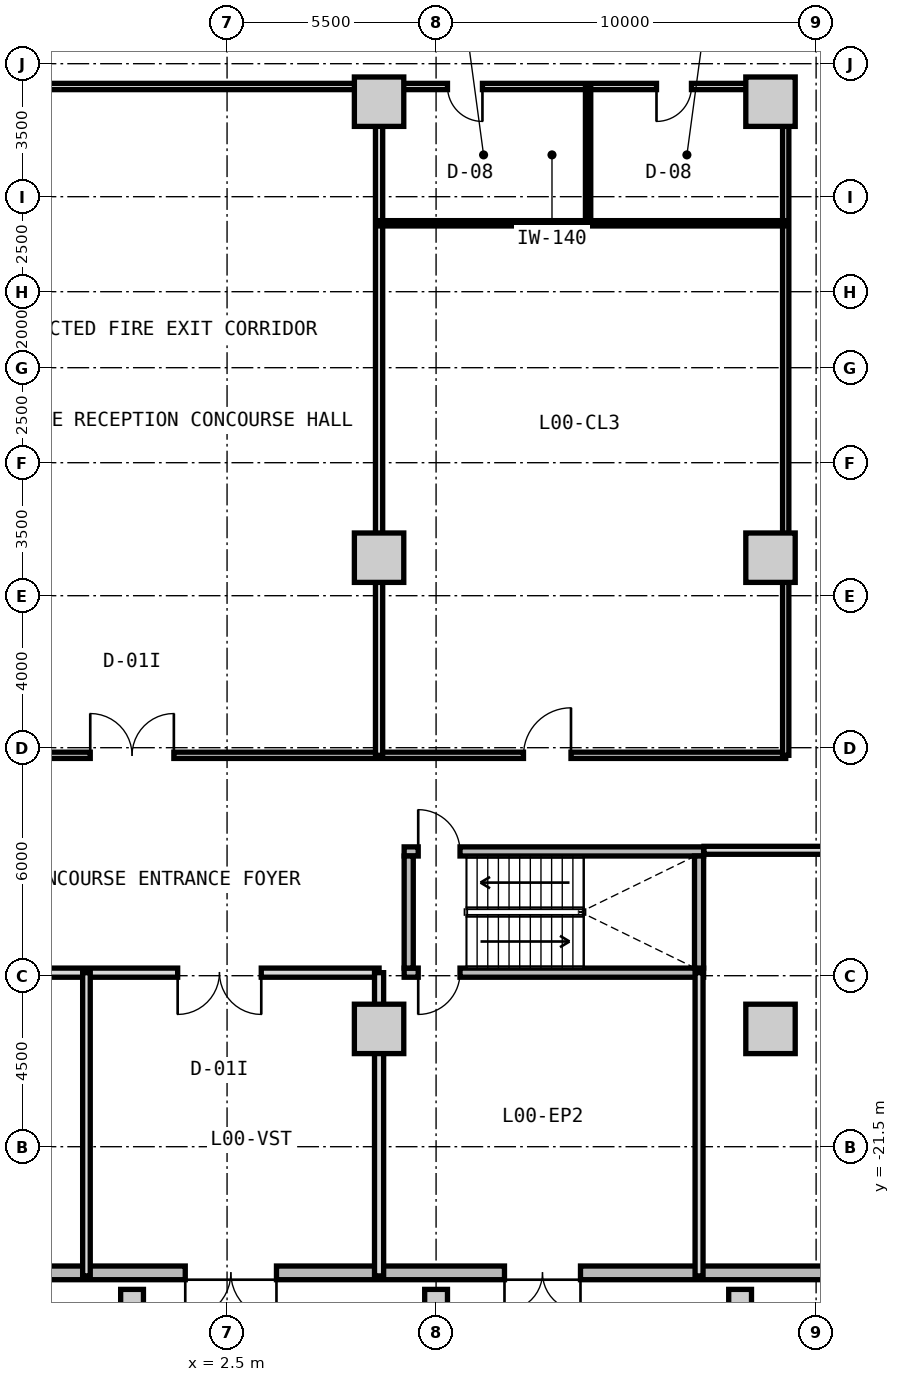
"""IFC4 building model, lengths in metres.
Left out: names, types, materials, properties, quantities, classifications, styles, units other than length and angle.
Written with IfcOpenShell. Run it as: python <this file> out.ifc"""

import sys

from ifc_helpers import new_model, si_unit, direction, frame, frame_2d, origin, origin_2d, place, context, subcontext, project, spatial, rectangle, extrude, source, transform, mapped, element, fill, save


model = new_model("IFC4")
c1 = context("Model", 3, precision=1e-05, world=origin(), true_north=direction((0.0, 1.0)))
c2 = subcontext(c1, "Body", "Model", "MODEL_VIEW")
j1 = project(units=[si_unit("LENGTHUNIT", "METRE"), si_unit("PLANEANGLEUNIT", "RADIAN")], contexts=[c1])
p1 = place(None, origin())
s1 = spatial("IfcSite", under=j1, at=p1, CompositionType="ELEMENT")
p2 = place(p1, origin())
s2 = spatial("IfcBuilding", under=s1, at=p2, CompositionType="ELEMENT")
p3 = place(p2, origin())
s3 = spatial("IfcBuildingStorey", under=s2, at=p3, CompositionType="ELEMENT", Elevation=0.0)
m1 = source(origin(), c2, "Body", "SweptSolid", [
    extrude(rectangle(XDim=1.3, YDim=1.3, at=origin_2d()), origin(), (0.0, 0.0, 1.0), 4.2),
])
for number, where, z_axis, x_axis in (
    (1, (6.5, -18.4, 0.0), (0.0, 0.0, 1.0), (1.0, 0.0, 0.0)),
    (2, (16.8, -18.4, 0.0), (0.0, 0.0, 1.0), (1.0, 0.0, 0.0)),
    (3, (6.5, -6.0, 0.0), (0.0, 0.0, 1.0), (1.0, 0.0, 0.0)),
    (4, (6.5, 6.0, 0.0), (0.0, 0.0, 1.0), (1.0, 0.0, 0.0)),
    (5, (16.8, -6.0, 0.0), (0.0, 0.0, 1.0), (1.0, 0.0, 0.0)),
    (6, (16.8, 6.0, 0.0), (0.0, 0.0, 1.0), (1.0, 0.0, 0.0)),
):
    element("IfcColumn", number, at=place(p3, frame(where, z_axis=z_axis, x_axis=x_axis)), inside=s3, PredefinedType="COLUMN", context=c2, shape_type="MappedRepresentation", body=[
        mapped(m1, transform((0.0, 0.0, 0.0), x_axis=(1.0, 0.0, 0.0), y_axis=(0.0, 1.0, 0.0), z_axis=(0.0, 0.0, 1.0), scale=1.0)),
    ])
m2 = source(origin(), c2, "Body", "SweptSolid", [
    extrude(rectangle(XDim=0.6, YDim=0.45, at=origin_2d()), origin(), (0.0, 0.0, 1.0), 4.2),
])
for number, where, z_axis, x_axis in (
    (7, (0.0, -25.48, 0.0), (0.0, 0.0, 1.0), (1.0, 0.0, 0.0)),
    (8, (8.0, -25.48, 0.0), (0.0, 0.0, 1.0), (1.0, 0.0, 0.0)),
    (9, (16.0, -25.48, 0.0), (0.0, 0.0, 1.0), (1.0, 0.0, 0.0)),
):
    element("IfcColumn", number, at=place(p3, frame(where, z_axis=z_axis, x_axis=x_axis)), inside=s3, PredefinedType="PILASTER", context=c2, shape_type="MappedRepresentation", body=[
        mapped(m2, transform((0.0, 0.0, 0.0), x_axis=(1.0, 0.0, 0.0), y_axis=(0.0, 1.0, 0.0), z_axis=(0.0, 0.0, 1.0), scale=1.0)),
    ])
m3 = source(origin(), c2, "Body", "SweptSolid", [
    extrude(rectangle(XDim=108.64, YDim=0.36, at=frame_2d((54.32, 0.0))), origin(), (0.0, 0.0, 1.0), 3.88),
])
p4 = place(p3, frame((54.32, -24.82, 0.0), z_axis=(0.0, 0.0, 1.0), x_axis=(-1.0, 0.0, 0.0)))
e10 = element("IfcWall", 10, at=p4, inside=s3, PredefinedType="SOLIDWALL", context=c2, shape_type="MappedRepresentation", body=[
    mapped(m3, transform((0.0, 0.0, 0.0), x_axis=(1.0, 0.0, 0.0), y_axis=(0.0, 1.0, 0.0), z_axis=(0.0, 0.0, 1.0), scale=1.0)),
])
p5 = place(p4, frame((50.52, 0.0, 0.0)))
e11 = element("IfcOpeningElement", 11, at=p5, cuts=e10, PredefinedType="OPENING", context=c2, shape_type="SweptSolid", body=[
    extrude(rectangle(XDim=2.4, YDim=2.6, at=frame_2d((1.2, 1.3))), frame((0.0, 0.19, 0.0), z_axis=(0.0, -1.0, 0.0), x_axis=(1.0, 0.0, 0.0)), (0.0, 0.0, 1.0), 0.38),
])
p6 = place(p4, frame((57.12, 0.0, 0.0)))
e12 = element("IfcOpeningElement", 12, at=p6, cuts=e10, PredefinedType="OPENING", context=c2, shape_type="SweptSolid", body=[
    extrude(rectangle(XDim=2.0, YDim=2.3, at=frame_2d((1.0, 1.15))), frame((0.0, 0.19, 0.0), z_axis=(0.0, -1.0, 0.0), x_axis=(1.0, 0.0, 0.0)), (0.0, 0.0, 1.0), 0.38),
])
p7 = place(p4, frame((42.52, 0.0, 0.0)))
e13 = element("IfcOpeningElement", 13, at=p7, cuts=e10, PredefinedType="OPENING", context=c2, shape_type="SweptSolid", body=[
    extrude(rectangle(XDim=2.0, YDim=2.3, at=frame_2d((1.0, 1.15))), frame((0.0, 0.19, 0.0), z_axis=(0.0, -1.0, 0.0), x_axis=(1.0, 0.0, 0.0)), (0.0, 0.0, 1.0), 0.38),
])
p8 = place(p4, frame((64.12, 0.0, 0.0)))
e14 = element("IfcOpeningElement", 14, at=p8, cuts=e10, PredefinedType="OPENING", context=c2, shape_type="SweptSolid", body=[
    extrude(rectangle(XDim=2.0, YDim=2.3, at=frame_2d((1.0, 1.15))), frame((0.0, 0.19, 0.0), z_axis=(0.0, -1.0, 0.0), x_axis=(1.0, 0.0, 0.0)), (0.0, 0.0, 1.0), 0.38),
])
p9 = place(p4, frame((75.32, 0.0, 0.0)))
e15 = element("IfcOpeningElement", 15, at=p9, cuts=e10, PredefinedType="OPENING", context=c2, shape_type="SweptSolid", body=[
    extrude(rectangle(XDim=2.0, YDim=2.3, at=frame_2d((1.0, 1.15))), frame((0.0, 0.19, 0.0), z_axis=(0.0, -1.0, 0.0), x_axis=(1.0, 0.0, 0.0)), (0.0, 0.0, 1.0), 0.38),
])
p10 = place(p4, frame((34.12, 0.0, 0.0)))
e16 = element("IfcOpeningElement", 16, at=p10, cuts=e10, PredefinedType="OPENING", context=c2, shape_type="SweptSolid", body=[
    extrude(rectangle(XDim=2.0, YDim=2.3, at=frame_2d((1.0, 1.15))), frame((0.0, 0.19, 0.0), z_axis=(0.0, -1.0, 0.0), x_axis=(1.0, 0.0, 0.0)), (0.0, 0.0, 1.0), 0.38),
])
m4 = source(origin(), c2, "Body", "SweptSolid", [
    extrude(rectangle(XDim=7.88, YDim=0.24, at=frame_2d((3.94, 0.0))), origin(), (0.0, 0.0, 1.0), 3.88),
])
p11 = place(p3, frame((7.16, -13.73, 0.0), z_axis=(0.0, 0.0, 1.0), x_axis=(1.0, 0.0, 0.0)))
e17 = element("IfcWall", 17, at=p11, inside=s3, PredefinedType="PARTITIONING", context=c2, shape_type="MappedRepresentation", body=[
    mapped(m4, transform((0.0, 0.0, 0.0), x_axis=(1.0, 0.0, 0.0), y_axis=(0.0, 1.0, 0.0), z_axis=(0.0, 0.0, 1.0), scale=1.0)),
])
p12 = place(p11, frame((0.37, 0.0, 0.0)))
e18 = element("IfcOpeningElement", 18, at=p12, cuts=e17, PredefinedType="OPENING", context=c2, shape_type="SweptSolid", body=[
    extrude(rectangle(XDim=1.1, YDim=2.15, at=frame_2d((0.55, 1.075))), frame((0.0, 0.13, 0.0), z_axis=(0.0, -1.0, 0.0), x_axis=(1.0, 0.0, 0.0)), (0.0, 0.0, 1.0), 0.26),
])
p13 = place(p3, frame((7.16, -16.92, 0.0), z_axis=(0.0, 0.0, 1.0), x_axis=(1.0, 0.0, 0.0)))
e19 = element("IfcWall", 19, at=p13, inside=s3, PredefinedType="PARTITIONING", context=c2, shape_type="MappedRepresentation", body=[
    mapped(m4, transform((0.0, 0.0, 0.0), x_axis=(1.0, 0.0, 0.0), y_axis=(0.0, 1.0, 0.0), z_axis=(0.0, 0.0, 1.0), scale=1.0)),
])
p14 = place(p13, frame((0.37, 0.0, 0.0)))
e20 = element("IfcOpeningElement", 20, at=p14, cuts=e19, PredefinedType="OPENING", context=c2, shape_type="SweptSolid", body=[
    extrude(rectangle(XDim=1.1, YDim=2.15, at=frame_2d((0.55, 1.075))), frame((0.0, 0.13, 0.0), z_axis=(0.0, -1.0, 0.0), x_axis=(1.0, 0.0, 0.0)), (0.0, 0.0, 1.0), 0.26),
])
m5 = source(origin(), c2, "Body", "SweptSolid", [
    extrude(rectangle(XDim=2.95, YDim=0.24, at=frame_2d((1.475, 0.0))), origin(), (0.0, 0.0, 1.0), 3.88),
])
for number, where, z_axis, x_axis in (
    (21, (7.28, -16.8, 0.0), (0.0, 0.0, 1.0), (0.0, 1.0, 0.0)),
    (22, (14.92, -16.8, 0.0), (0.0, 0.0, 1.0), (0.0, 1.0, 0.0)),
):
    element("IfcWall", number, at=place(p3, frame(where, z_axis=z_axis, x_axis=x_axis)), inside=s3, PredefinedType="PARTITIONING", context=c2, shape_type="MappedRepresentation", body=[
        mapped(m5, transform((0.0, 0.0, 0.0), x_axis=(1.0, 0.0, 0.0), y_axis=(0.0, 1.0, 0.0), z_axis=(0.0, 0.0, 1.0), scale=1.0)),
    ])
m6 = source(origin(), c2, "Body", "SweptSolid", [
    extrude(rectangle(XDim=34.4, YDim=0.165, at=frame_2d((17.2, 0.0))), origin(), (0.0, 0.0, 1.0), 3.865),
])
p15 = place(p3, frame((-17.2, -11.2, 0.0), z_axis=(0.0, 0.0, 1.0), x_axis=(1.0, 0.0, 0.0)))
e23 = element("IfcWall", 23, at=p15, inside=s3, PredefinedType="PARTITIONING", context=c2, shape_type="MappedRepresentation", body=[
    mapped(m6, transform((0.0, 0.0, 0.0), x_axis=(1.0, 0.0, 0.0), y_axis=(0.0, 1.0, 0.0), z_axis=(0.0, 0.0, 1.0), scale=1.0)),
])
p16 = place(p15, frame((4.2, 0.0, 0.0)))
e24 = element("IfcOpeningElement", 24, at=p16, cuts=e23, PredefinedType="OPENING", context=c2, shape_type="SweptSolid", body=[
    extrude(rectangle(XDim=1.25, YDim=2.2, at=frame_2d((0.625, 1.1))), frame((0.0, 0.093, 0.0), z_axis=(0.0, -1.0, 0.0), x_axis=(1.0, 0.0, 0.0)), (0.0, 0.0, 1.0), 0.185),
])
p17 = place(p15, frame((16.1, 0.0, 0.0)))
e25 = element("IfcOpeningElement", 25, at=p17, cuts=e23, PredefinedType="OPENING", context=c2, shape_type="SweptSolid", body=[
    extrude(rectangle(XDim=2.2, YDim=2.4, at=frame_2d((1.1, 1.2))), frame((0.0, 0.093, 0.0), z_axis=(0.0, -1.0, 0.0), x_axis=(1.0, 0.0, 0.0)), (0.0, 0.0, 1.0), 0.185),
])
p18 = place(p15, frame((27.5, 0.0, 0.0)))
e26 = element("IfcOpeningElement", 26, at=p18, cuts=e23, PredefinedType="OPENING", context=c2, shape_type="SweptSolid", body=[
    extrude(rectangle(XDim=1.25, YDim=2.2, at=frame_2d((0.625, 1.1))), frame((0.0, 0.093, 0.0), z_axis=(0.0, -1.0, 0.0), x_axis=(1.0, 0.0, 0.0)), (0.0, 0.0, 1.0), 0.185),
])
p19 = place(p3, frame((-17.2, 6.4, 0.0), z_axis=(0.0, 0.0, 1.0), x_axis=(1.0, 0.0, 0.0)))
e27 = element("IfcWall", 27, at=p19, inside=s3, PredefinedType="PARTITIONING", context=c2, shape_type="MappedRepresentation", body=[
    mapped(m6, transform((0.0, 0.0, 0.0), x_axis=(1.0, 0.0, 0.0), y_axis=(0.0, 1.0, 0.0), z_axis=(0.0, 0.0, 1.0), scale=1.0)),
])
p20 = place(p19, frame((4.2, 0.0, 0.0)))
e28 = element("IfcOpeningElement", 28, at=p20, cuts=e27, PredefinedType="OPENING", context=c2, shape_type="SweptSolid", body=[
    extrude(rectangle(XDim=1.25, YDim=2.2, at=frame_2d((0.625, 1.1))), frame((0.0, 0.093, 0.0), z_axis=(0.0, -1.0, 0.0), x_axis=(1.0, 0.0, 0.0)), (0.0, 0.0, 1.0), 0.185),
])
p21 = place(p19, frame((25.5, 0.0, 0.0)))
e29 = element("IfcOpeningElement", 29, at=p21, cuts=e27, PredefinedType="OPENING", context=c2, shape_type="SweptSolid", body=[
    extrude(rectangle(XDim=0.92, YDim=2.1, at=frame_2d((0.46, 1.05))), frame((0.0, 0.093, 0.0), z_axis=(0.0, -1.0, 0.0), x_axis=(1.0, 0.0, 0.0)), (0.0, 0.0, 1.0), 0.185),
])
p22 = place(p19, frame((31.0, 0.0, 0.0)))
e30 = element("IfcOpeningElement", 30, at=p22, cuts=e27, PredefinedType="OPENING", context=c2, shape_type="SweptSolid", body=[
    extrude(rectangle(XDim=0.92, YDim=2.1, at=frame_2d((0.46, 1.05))), frame((0.0, 0.093, 0.0), z_axis=(0.0, -1.0, 0.0), x_axis=(1.0, 0.0, 0.0)), (0.0, 0.0, 1.0), 0.185),
])
m7 = source(origin(), c2, "Body", "SweptSolid", [
    extrude(rectangle(XDim=17.6, YDim=0.165, at=frame_2d((8.8, 0.0))), origin(), (0.0, 0.0, 1.0), 3.865),
])
p23 = place(p3, frame((17.2, -11.2, 0.0), z_axis=(0.0, 0.0, 1.0), x_axis=(0.0, 1.0, 0.0)))
e31 = element("IfcWall", 31, at=p23, inside=s3, PredefinedType="PARTITIONING", context=c2, shape_type="MappedRepresentation", body=[
    mapped(m7, transform((0.0, 0.0, 0.0), x_axis=(1.0, 0.0, 0.0), y_axis=(0.0, 1.0, 0.0), z_axis=(0.0, 0.0, 1.0), scale=1.0)),
])
m8 = source(origin(), c2, "Body", "SweptSolid", [
    extrude(rectangle(XDim=17.6, YDim=0.19, at=frame_2d((8.8, 0.0))), origin(), (0.0, 0.0, 1.0), 3.215),
])
p24 = place(p3, frame((6.5, -11.2, 0.0), z_axis=(0.0, 0.0, 1.0), x_axis=(0.0, 1.0, 0.0)))
e32 = element("IfcWall", 32, at=p24, inside=s3, PredefinedType="PARTITIONING", context=c2, shape_type="MappedRepresentation", body=[
    mapped(m8, transform((0.0, 0.0, 0.0), x_axis=(1.0, 0.0, 0.0), y_axis=(0.0, 1.0, 0.0), z_axis=(0.0, 0.0, 1.0), scale=1.0)),
])
m9 = source(origin(), c2, "Body", "SweptSolid", [
    extrude(rectangle(XDim=3.6, YDim=0.14, at=frame_2d((1.8, 0.0))), origin(), (0.0, 0.0, 1.0), 3.865),
])
p25 = place(p3, frame((12.0, 2.8, 0.0), z_axis=(0.0, 0.0, 1.0), x_axis=(0.0, 1.0, 0.0)))
e33 = element("IfcWall", 33, at=p25, inside=s3, PredefinedType="PARTITIONING", context=c2, shape_type="MappedRepresentation", body=[
    mapped(m9, transform((0.0, 0.0, 0.0), x_axis=(1.0, 0.0, 0.0), y_axis=(0.0, 1.0, 0.0), z_axis=(0.0, 0.0, 1.0), scale=1.0)),
])
m10 = source(origin(), c2, "Body", "SweptSolid", [
    extrude(rectangle(XDim=10.7, YDim=0.14, at=frame_2d((5.35, 0.0))), origin(), (0.0, 0.0, 1.0), 3.865),
])
p26 = place(p3, frame((6.5, 2.8, 0.0), z_axis=(0.0, 0.0, 1.0), x_axis=(1.0, 0.0, 0.0)))
e34 = element("IfcWall", 34, at=p26, inside=s3, PredefinedType="PARTITIONING", context=c2, shape_type="MappedRepresentation", body=[
    mapped(m10, transform((0.0, 0.0, 0.0), x_axis=(1.0, 0.0, 0.0), y_axis=(0.0, 1.0, 0.0), z_axis=(0.0, 0.0, 1.0), scale=1.0)),
])
m11 = source(origin(), c2, "Body", "SweptSolid", [
    extrude(rectangle(XDim=13.0, YDim=0.24, at=frame_2d((6.5, 0.0))), origin(), (0.0, 0.0, 1.0), 3.865),
])
p27 = place(p3, frame((-6.5, -16.92, 0.0), z_axis=(0.0, 0.0, 1.0), x_axis=(1.0, 0.0, 0.0)))
e35 = element("IfcWall", 35, at=p27, inside=s3, PredefinedType="PARTITIONING", context=c2, shape_type="MappedRepresentation", body=[
    mapped(m11, transform((0.0, 0.0, 0.0), x_axis=(1.0, 0.0, 0.0), y_axis=(0.0, 1.0, 0.0), z_axis=(0.0, 0.0, 1.0), scale=1.0)),
])
p28 = place(p27, frame((2.0, 0.0, 0.0)))
e36 = element("IfcOpeningElement", 36, at=p28, cuts=e35, PredefinedType="OPENING", context=c2, shape_type="SweptSolid", body=[
    extrude(rectangle(XDim=1.0, YDim=2.1, at=frame_2d((0.5, 1.05))), frame((0.0, 0.13, 0.0), z_axis=(0.0, -1.0, 0.0), x_axis=(1.0, 0.0, 0.0)), (0.0, 0.0, 1.0), 0.26),
])
p29 = place(p27, frame((7.7, 0.0, 0.0)))
e37 = element("IfcOpeningElement", 37, at=p29, cuts=e35, PredefinedType="OPENING", context=c2, shape_type="SweptSolid", body=[
    extrude(rectangle(XDim=2.2, YDim=2.4, at=frame_2d((1.1, 1.2))), frame((0.0, 0.13, 0.0), z_axis=(0.0, -1.0, 0.0), x_axis=(1.0, 0.0, 0.0)), (0.0, 0.0, 1.0), 0.26),
])
m12 = source(origin(), c2, "Body", "SweptSolid", [
    extrude(rectangle(XDim=7.98, YDim=0.24, at=frame_2d((3.99, 0.0))), origin(), (0.0, 0.0, 1.0), 3.215),
])
p30 = place(p3, frame((6.5, -24.9, 0.0), z_axis=(0.0, 0.0, 1.0), x_axis=(0.0, 1.0, 0.0)))
e38 = element("IfcWall", 38, at=p30, inside=s3, PredefinedType="PARTITIONING", context=c2, shape_type="MappedRepresentation", body=[
    mapped(m12, transform((0.0, 0.0, 0.0), x_axis=(1.0, 0.0, 0.0), y_axis=(0.0, 1.0, 0.0), z_axis=(0.0, 0.0, 1.0), scale=1.0)),
])
m13 = source(origin(), c2, "Body", "SweptSolid", [
    extrude(rectangle(XDim=7.98, YDim=0.2, at=frame_2d((3.99, 0.0))), origin(), (0.0, 0.0, 1.0), 3.865),
])
p31 = place(p3, frame((-1.2, -24.9, 0.0), z_axis=(0.0, 0.0, 1.0), x_axis=(0.0, 1.0, 0.0)))
e39 = element("IfcWall", 39, at=p31, inside=s3, PredefinedType="PARTITIONING", context=c2, shape_type="MappedRepresentation", body=[
    mapped(m13, transform((0.0, 0.0, 0.0), x_axis=(1.0, 0.0, 0.0), y_axis=(0.0, 1.0, 0.0), z_axis=(0.0, 0.0, 1.0), scale=1.0)),
])
m14 = source(origin(), c2, "Body", "SweptSolid", [
    extrude(rectangle(XDim=7.98, YDim=0.21, at=frame_2d((3.99, 0.0))), origin(), (0.0, 0.0, 1.0), 3.865),
])
p32 = place(p3, frame((14.92, -24.9, 0.0), z_axis=(0.0, 0.0, 1.0), x_axis=(0.0, 1.0, 0.0)))
e40 = element("IfcWall", 40, at=p32, inside=s3, PredefinedType="PARTITIONING", context=c2, shape_type="MappedRepresentation", body=[
    mapped(m14, transform((0.0, 0.0, 0.0), x_axis=(1.0, 0.0, 0.0), y_axis=(0.0, 1.0, 0.0), z_axis=(0.0, 0.0, 1.0), scale=1.0)),
])
m15 = source(origin(), c2, "Body", "SweptSolid", [
    extrude(rectangle(XDim=8.5, YDim=0.21, at=frame_2d((4.25, 0.0))), origin(), (0.0, 0.0, 1.0), 3.865),
])
p33 = place(p3, frame((15.05, -13.7, 0.0), z_axis=(0.0, 0.0, 1.0), x_axis=(1.0, 0.0, 0.0)))
e41 = element("IfcWall", 41, at=p33, inside=s3, PredefinedType="PARTITIONING", context=c2, shape_type="MappedRepresentation", body=[
    mapped(m15, transform((0.0, 0.0, 0.0), x_axis=(1.0, 0.0, 0.0), y_axis=(0.0, 1.0, 0.0), z_axis=(0.0, 0.0, 1.0), scale=1.0)),
])
p34 = place(p33, frame((3.55, 0.0, 0.0)))
e42 = element("IfcOpeningElement", 42, at=p34, cuts=e41, PredefinedType="OPENING", context=c2, shape_type="SweptSolid", body=[
    extrude(rectangle(XDim=1.1, YDim=2.15, at=frame_2d((0.55, 1.075))), frame((0.0, 0.115, 0.0), z_axis=(0.0, -1.0, 0.0), x_axis=(1.0, 0.0, 0.0)), (0.0, 0.0, 1.0), 0.23),
])
m16 = source(origin(), c2, "Body", "SweptSolid", [
    extrude(rectangle(XDim=2.4, YDim=2.6, at=frame_2d((1.2, 1.3))), frame((0.0, 0.025, 0.0), z_axis=(0.0, -1.0, 0.0), x_axis=(1.0, 0.0, 0.0)), (0.0, 0.0, 1.0), 0.05),
])
p35 = place(p5, origin())
e43 = element("IfcDoor", 43, at=p35, inside=s3, OperationType="DOUBLE_DOOR_SINGLE_SWING", PredefinedType="DOOR", context=c2, shape_type="MappedRepresentation", body=[
    mapped(m16, transform((0.0, 0.0, 0.0), x_axis=(1.0, 0.0, 0.0), y_axis=(0.0, 1.0, 0.0), z_axis=(0.0, 0.0, 1.0), scale=1.0)),
])
fill(e11, e43)
m17 = source(origin(), c2, "Body", "SweptSolid", [
    extrude(rectangle(XDim=2.0, YDim=2.3, at=frame_2d((1.0, 1.15))), frame((0.0, 0.025, 0.0), z_axis=(0.0, -1.0, 0.0), x_axis=(1.0, 0.0, 0.0)), (0.0, 0.0, 1.0), 0.05),
])
p36 = place(p7, origin())
e44 = element("IfcDoor", 44, at=p36, inside=s3, OperationType="DOUBLE_DOOR_SINGLE_SWING", PredefinedType="DOOR", context=c2, shape_type="MappedRepresentation", body=[
    mapped(m17, transform((0.0, 0.0, 0.0), x_axis=(1.0, 0.0, 0.0), y_axis=(0.0, 1.0, 0.0), z_axis=(0.0, 0.0, 1.0), scale=1.0)),
])
fill(e13, e44)
m18 = source(origin(), c2, "Body", "SweptSolid", [
    extrude(rectangle(XDim=1.1, YDim=2.15, at=frame_2d((0.55, 1.075))), frame((0.0, 0.025, 0.0), z_axis=(0.0, -1.0, 0.0), x_axis=(1.0, 0.0, 0.0)), (0.0, 0.0, 1.0), 0.05),
])
p37 = place(p12, origin())
e45 = element("IfcDoor", 45, at=p37, inside=s3, OperationType="SINGLE_SWING_LEFT", PredefinedType="DOOR", context=c2, shape_type="MappedRepresentation", body=[
    mapped(m18, transform((0.0, 0.0, 0.0), x_axis=(1.0, 0.0, 0.0), y_axis=(0.0, 1.0, 0.0), z_axis=(0.0, 0.0, 1.0), scale=1.0)),
])
fill(e18, e45)
p38 = place(p14, frame((1.1, 0.0, 0.0), z_axis=(0.0, 0.0, 1.0), x_axis=(-1.0, 0.0, 0.0)))
e46 = element("IfcDoor", 46, at=p38, inside=s3, OperationType="SINGLE_SWING_RIGHT", PredefinedType="DOOR", context=c2, shape_type="MappedRepresentation", body=[
    mapped(m18, transform((0.0, 0.0, 0.0), x_axis=(1.0, 0.0, 0.0), y_axis=(0.0, 1.0, 0.0), z_axis=(0.0, 0.0, 1.0), scale=1.0)),
])
fill(e20, e46)
m19 = source(origin(), c2, "Body", "SweptSolid", [
    extrude(rectangle(XDim=2.2, YDim=2.4, at=frame_2d((1.1, 1.2))), frame((0.0, 0.025, 0.0), z_axis=(0.0, -1.0, 0.0), x_axis=(1.0, 0.0, 0.0)), (0.0, 0.0, 1.0), 0.05),
])
p39 = place(p17, origin())
e47 = element("IfcDoor", 47, at=p39, inside=s3, OperationType="DOUBLE_DOOR_SINGLE_SWING", PredefinedType="DOOR", context=c2, shape_type="MappedRepresentation", body=[
    mapped(m19, transform((0.0, 0.0, 0.0), x_axis=(1.0, 0.0, 0.0), y_axis=(0.0, 1.0, 0.0), z_axis=(0.0, 0.0, 1.0), scale=1.0)),
])
fill(e25, e47)
m20 = source(origin(), c2, "Body", "SweptSolid", [
    extrude(rectangle(XDim=1.25, YDim=2.2, at=frame_2d((0.625, 1.1))), frame((0.0, 0.025, 0.0), z_axis=(0.0, -1.0, 0.0), x_axis=(1.0, 0.0, 0.0)), (0.0, 0.0, 1.0), 0.05),
])
p40 = place(p18, origin())
e48 = element("IfcDoor", 48, at=p40, inside=s3, OperationType="SINGLE_SWING_RIGHT", PredefinedType="DOOR", context=c2, shape_type="MappedRepresentation", body=[
    mapped(m20, transform((0.0, 0.0, 0.0), x_axis=(1.0, 0.0, 0.0), y_axis=(0.0, 1.0, 0.0), z_axis=(0.0, 0.0, 1.0), scale=1.0)),
])
fill(e26, e48)
m21 = source(origin(), c2, "Body", "SweptSolid", [
    extrude(rectangle(XDim=0.92, YDim=2.1, at=frame_2d((0.46, 1.05))), frame((0.0, 0.025, 0.0), z_axis=(0.0, -1.0, 0.0), x_axis=(1.0, 0.0, 0.0)), (0.0, 0.0, 1.0), 0.05),
])
p41 = place(p21, frame((0.92, 0.0, 0.0), z_axis=(0.0, 0.0, 1.0), x_axis=(-1.0, 0.0, 0.0)))
e49 = element("IfcDoor", 49, at=p41, inside=s3, OperationType="SINGLE_SWING_LEFT", PredefinedType="DOOR", context=c2, shape_type="MappedRepresentation", body=[
    mapped(m21, transform((0.0, 0.0, 0.0), x_axis=(1.0, 0.0, 0.0), y_axis=(0.0, 1.0, 0.0), z_axis=(0.0, 0.0, 1.0), scale=1.0)),
])
fill(e29, e49)
p42 = place(p22, frame((0.92, 0.0, 0.0), z_axis=(0.0, 0.0, 1.0), x_axis=(-1.0, 0.0, 0.0)))
e50 = element("IfcDoor", 50, at=p42, inside=s3, OperationType="SINGLE_SWING_RIGHT", PredefinedType="DOOR", context=c2, shape_type="MappedRepresentation", body=[
    mapped(m21, transform((0.0, 0.0, 0.0), x_axis=(1.0, 0.0, 0.0), y_axis=(0.0, 1.0, 0.0), z_axis=(0.0, 0.0, 1.0), scale=1.0)),
])
fill(e30, e50)
p43 = place(p29, frame((2.2, 0.0, 0.0), z_axis=(0.0, 0.0, 1.0), x_axis=(-1.0, 0.0, 0.0)))
e51 = element("IfcDoor", 51, at=p43, inside=s3, OperationType="DOUBLE_DOOR_SINGLE_SWING", PredefinedType="DOOR", context=c2, shape_type="MappedRepresentation", body=[
    mapped(m19, transform((0.0, 0.0, 0.0), x_axis=(1.0, 0.0, 0.0), y_axis=(0.0, 1.0, 0.0), z_axis=(0.0, 0.0, 1.0), scale=1.0)),
])
fill(e37, e51)
save(model, sys.argv[1])
